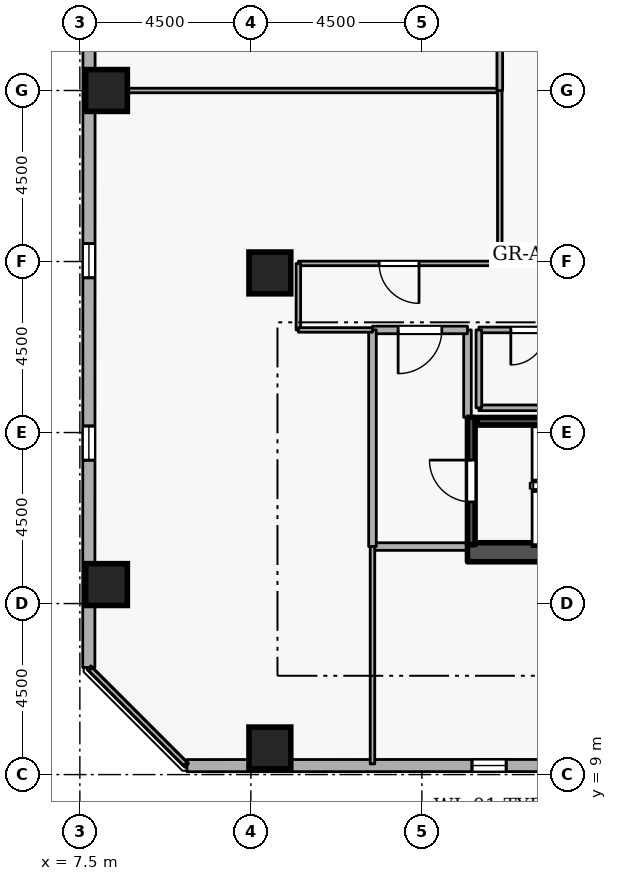
"""IFC4 building model, lengths in metres.
Left out: names, types, materials, properties, quantities, classifications, styles, units other than length and angle.
Written with IfcOpenShell. Run it as: python <this file> out.ifc"""

import sys

from ifc_helpers import new_model, si_unit, direction, frame, frame_2d, origin, origin_2d, place, context, subcontext, project, spatial, rectangle, extrude, element, fill, save


model = new_model("IFC4")
c1 = context("Model", 3, precision=1e-05, world=origin(), true_north=direction((0.0, 1.0)))
c2 = subcontext(c1, "Body", "Model", "MODEL_VIEW")
j1 = project(units=[si_unit("LENGTHUNIT", "METRE"), si_unit("PLANEANGLEUNIT", "RADIAN")], contexts=[c1])
p1 = place(None, origin())
s1 = spatial("IfcSite", under=j1, at=p1, CompositionType="ELEMENT")
p2 = place(p1, origin())
s2 = spatial("IfcBuilding", under=s1, at=p2, CompositionType="ELEMENT")
p3 = place(p2, frame((0.0, 0.0, 178.5)))
s3 = spatial("IfcBuildingStorey", under=s2, at=p3, CompositionType="ELEMENT", Elevation=178.5)
p4 = place(p3, frame((17.7, 14.85, 0.0), z_axis=(0.0, 0.0, 1.0), x_axis=(1.0, 0.0, 0.0)))
e1 = element("IfcWall", 1, at=p4, inside=s3, PredefinedType="SHEAR", context=c2, shape_type="SweptSolid", body=[
    extrude(rectangle(XDim=15.6, YDim=0.5, at=frame_2d((7.8, 0.0))), origin(), (0.0, 0.0, 1.0), 3.6),
])
for number, where, z_axis, x_axis in (
    (2, (12.5, 9.7, 0.0), (0.0, 0.0, 1.0), (1.0, 0.0, 0.0)),
    (3, (8.2, 14.0, 0.0), (0.0, 0.0, 1.0), (1.0, 0.0, 0.0)),
    (4, (8.2, 27.0, 0.0), (0.0, 0.0, 1.0), (1.0, 0.0, 0.0)),
    (5, (12.5, 22.2, 0.0), (0.0, 0.0, 1.0), (1.0, 0.0, 0.0)),
):
    element("IfcColumn", number, at=place(p3, frame(where, z_axis=z_axis, x_axis=x_axis)), inside=s3, PredefinedType="COLUMN", context=c2, shape_type="SweptSolid", body=[
        extrude(rectangle(XDim=1.1, YDim=1.1, at=origin_2d()), origin(), (0.0, 0.0, 1.0), 3.6),
    ])
p5 = place(p3, frame((10.319, 9.235, 0.0), z_axis=(0.0, 0.0, 1.0), x_axis=(0.999999944762, 0.000332378036, 0.0)))
e6 = element("IfcWall", 6, at=p5, inside=s3, PredefinedType="STANDARD", context=c2, shape_type="SweptSolid", body=[
    extrude(rectangle(XDim=33.054, YDim=0.32, at=frame_2d((16.527, 0.0))), origin(), (0.0, 0.0, 1.0), 2.7),
])
p6 = place(p5, frame((7.5, 0.0, 0.72)))
e7 = element("IfcOpeningElement", 7, at=p6, cuts=e6, PredefinedType="OPENING", context=c2, shape_type="SweptSolid", body=[
    extrude(rectangle(XDim=0.9, YDim=1.75, at=frame_2d((0.45, 0.875))), frame((0.0, 0.17, 0.0), z_axis=(0.0, -1.0, 0.0), x_axis=(1.0, 0.0, 0.0)), (0.0, 0.0, 1.0), 0.34),
])
p7 = place(p5, frame((12.3, 0.0, 0.72)))
e8 = element("IfcOpeningElement", 8, at=p7, cuts=e6, PredefinedType="OPENING", context=c2, shape_type="SweptSolid", body=[
    extrude(rectangle(XDim=0.9, YDim=1.75, at=frame_2d((0.45, 0.875))), frame((0.0, 0.17, 0.0), z_axis=(0.0, -1.0, 0.0), x_axis=(1.0, 0.0, 0.0)), (0.0, 0.0, 1.0), 0.34),
])
p8 = place(p5, frame((17.1, 0.0, 0.72)))
e9 = element("IfcOpeningElement", 9, at=p8, cuts=e6, PredefinedType="OPENING", context=c2, shape_type="SweptSolid", body=[
    extrude(rectangle(XDim=0.9, YDim=1.75, at=frame_2d((0.45, 0.875))), frame((0.0, 0.17, 0.0), z_axis=(0.0, -1.0, 0.0), x_axis=(1.0, 0.0, 0.0)), (0.0, 0.0, 1.0), 0.34),
])
p9 = place(p5, frame((21.9, 0.0, 0.72)))
e10 = element("IfcOpeningElement", 10, at=p9, cuts=e6, PredefinedType="OPENING", context=c2, shape_type="SweptSolid", body=[
    extrude(rectangle(XDim=0.9, YDim=1.75, at=frame_2d((0.45, 0.875))), frame((0.0, 0.17, 0.0), z_axis=(0.0, -1.0, 0.0), x_axis=(1.0, 0.0, 0.0)), (0.0, 0.0, 1.0), 0.34),
])
p10 = place(p3, frame((7.746, 44.872, 0.0), z_axis=(0.0, 0.0, 1.0), x_axis=(-0.000332378036, -0.999999944762, 0.0)))
e11 = element("IfcWall", 11, at=p10, inside=s3, PredefinedType="STANDARD", context=c2, shape_type="SweptSolid", body=[
    extrude(rectangle(XDim=33.054, YDim=0.32, at=frame_2d((16.527, 0.0))), origin(), (0.0, 0.0, 1.0), 2.7),
])
p11 = place(p10, frame((2.7, 0.0, 0.72)))
e12 = element("IfcOpeningElement", 12, at=p11, cuts=e11, PredefinedType="OPENING", context=c2, shape_type="SweptSolid", body=[
    extrude(rectangle(XDim=0.9, YDim=1.75, at=frame_2d((0.45, 0.875))), frame((0.0, 0.17, 0.0), z_axis=(0.0, -1.0, 0.0), x_axis=(1.0, 0.0, 0.0)), (0.0, 0.0, 1.0), 0.34),
])
p12 = place(p10, frame((7.5, 0.0, 0.72)))
e13 = element("IfcOpeningElement", 13, at=p12, cuts=e11, PredefinedType="OPENING", context=c2, shape_type="SweptSolid", body=[
    extrude(rectangle(XDim=0.9, YDim=1.75, at=frame_2d((0.45, 0.875))), frame((0.0, 0.17, 0.0), z_axis=(0.0, -1.0, 0.0), x_axis=(1.0, 0.0, 0.0)), (0.0, 0.0, 1.0), 0.34),
])
p13 = place(p10, frame((12.3, 0.0, 0.72)))
e14 = element("IfcOpeningElement", 14, at=p13, cuts=e11, PredefinedType="OPENING", context=c2, shape_type="SweptSolid", body=[
    extrude(rectangle(XDim=0.9, YDim=1.75, at=frame_2d((0.45, 0.875))), frame((0.0, 0.17, 0.0), z_axis=(0.0, -1.0, 0.0), x_axis=(1.0, 0.0, 0.0)), (0.0, 0.0, 1.0), 0.34),
])
p14 = place(p10, frame((21.9, 0.0, 0.72)))
e15 = element("IfcOpeningElement", 15, at=p14, cuts=e11, PredefinedType="OPENING", context=c2, shape_type="SweptSolid", body=[
    extrude(rectangle(XDim=0.9, YDim=1.75, at=frame_2d((0.45, 0.875))), frame((0.0, 0.17, 0.0), z_axis=(0.0, -1.0, 0.0), x_axis=(1.0, 0.0, 0.0)), (0.0, 0.0, 1.0), 0.34),
])
p15 = place(p10, frame((26.7, 0.0, 0.72)))
e16 = element("IfcOpeningElement", 16, at=p15, cuts=e11, PredefinedType="OPENING", context=c2, shape_type="SweptSolid", body=[
    extrude(rectangle(XDim=0.9, YDim=1.75, at=frame_2d((0.45, 0.875))), frame((0.0, 0.17, 0.0), z_axis=(0.0, -1.0, 0.0), x_axis=(1.0, 0.0, 0.0)), (0.0, 0.0, 1.0), 0.34),
])
p16 = place(p3, frame((17.8, 15.05, 0.0), z_axis=(0.0, 0.0, 1.0), x_axis=(0.0, 1.0, 0.0)))
e17 = element("IfcWall", 17, at=p16, inside=s3, PredefinedType="SHEAR", context=c2, shape_type="SweptSolid", body=[
    extrude(rectangle(XDim=3.35, YDim=0.2, at=frame_2d((1.675, 0.0))), origin(), (0.0, 0.0, 1.0), 3.6),
])
p17 = place(p16, frame((1.125, 0.0, 0.0)))
e18 = element("IfcOpeningElement", 18, at=p17, cuts=e17, PredefinedType="OPENING", context=c2, shape_type="SweptSolid", body=[
    extrude(rectangle(XDim=1.1, YDim=2.1, at=frame_2d((0.55, 1.05))), frame((0.0, 0.11, 0.0), z_axis=(0.0, -1.0, 0.0), x_axis=(1.0, 0.0, 0.0)), (0.0, 0.0, 1.0), 0.22),
])
p18 = place(p3, frame((25.05, 18.297, 0.0), z_axis=(0.0, 0.0, 1.0), x_axis=(-1.0, 0.0, 0.0)))
e19 = element("IfcWall", 19, at=p18, inside=s3, PredefinedType="SHEAR", context=c2, shape_type="SweptSolid", body=[
    extrude(rectangle(XDim=7.1, YDim=0.2, at=frame_2d((3.55, 0.0))), origin(), (0.0, 0.0, 1.0), 3.6),
])
p19 = place(p3, frame((15.2, 15.0, 0.0), z_axis=(0.0, 0.0, 1.0), x_axis=(1.0, 0.0, 0.0)))
e20 = element("IfcWall", 20, at=p19, inside=s3, PredefinedType="STANDARD", context=c2, shape_type="SweptSolid", body=[
    extrude(rectangle(XDim=2.5, YDim=0.2, at=frame_2d((1.25, 0.0))), origin(), (0.0, 0.0, 1.0), 3.34),
])
p20 = place(p3, frame((17.7, 18.4, 0.0), z_axis=(0.0, 0.0, 1.0), x_axis=(0.0, 1.0, 0.0)))
e21 = element("IfcWall", 21, at=p20, inside=s3, PredefinedType="STANDARD", context=c2, shape_type="SweptSolid", body=[
    extrude(rectangle(XDim=2.3, YDim=0.2, at=frame_2d((1.15, 0.0))), origin(), (0.0, 0.0, 1.0), 2.545),
])
p21 = place(p3, frame((17.7, 20.7, 0.0), z_axis=(0.0, 0.0, 1.0), x_axis=(-1.0, 0.0, 0.0)))
e22 = element("IfcWall", 22, at=p21, inside=s3, PredefinedType="STANDARD", context=c2, shape_type="SweptSolid", body=[
    extrude(rectangle(XDim=2.5, YDim=0.2, at=frame_2d((1.25, 0.0))), origin(), (0.0, 0.0, 1.0), 3.34),
])
p22 = place(p21, frame((0.675, 0.0, 0.0)))
e23 = element("IfcOpeningElement", 23, at=p22, cuts=e22, PredefinedType="OPENING", context=c2, shape_type="SweptSolid", body=[
    extrude(rectangle(XDim=1.15, YDim=2.1, at=frame_2d((0.575, 1.05))), frame((0.0, 0.11, 0.0), z_axis=(0.0, -1.0, 0.0), x_axis=(1.0, 0.0, 0.0)), (0.0, 0.0, 1.0), 0.22),
])
p23 = place(p3, frame((15.2, 20.7, 0.0), z_axis=(0.0, 0.0, 1.0), x_axis=(0.0, -1.0, 0.0)))
e24 = element("IfcWall", 24, at=p23, inside=s3, PredefinedType="STANDARD", context=c2, shape_type="SweptSolid", body=[
    extrude(rectangle(XDim=5.7, YDim=0.2, at=frame_2d((2.85, 0.0))), origin(), (0.0, 0.0, 1.0), 3.34),
])
p24 = place(p3, frame((18.0, 18.65, 0.0), z_axis=(0.0, 0.0, 1.0), x_axis=(1.0, 0.0, 0.0)))
e25 = element("IfcWall", 25, at=p24, inside=s3, PredefinedType="PARTITIONING", context=c2, shape_type="SweptSolid", body=[
    extrude(rectangle(XDim=2.6, YDim=0.15, at=frame_2d((1.3, 0.0))), origin(), (0.0, 0.0, 1.0), 3.34),
])
p25 = place(p3, frame((20.6, 20.7, 0.0), z_axis=(0.0, 0.0, 1.0), x_axis=(-1.0, 0.0, 0.0)))
e26 = element("IfcWall", 26, at=p25, inside=s3, PredefinedType="PARTITIONING", context=c2, shape_type="SweptSolid", body=[
    extrude(rectangle(XDim=2.6, YDim=0.15, at=frame_2d((1.3, 0.0))), origin(), (0.0, 0.0, 1.0), 3.34),
])
p26 = place(p25, frame((0.84, 0.0, 0.0)))
e27 = element("IfcOpeningElement", 27, at=p26, cuts=e26, PredefinedType="OPENING", context=c2, shape_type="SweptSolid", body=[
    extrude(rectangle(XDim=0.92, YDim=2.08, at=frame_2d((0.46, 1.04))), frame((0.0, 0.085, 0.0), z_axis=(0.0, -1.0, 0.0), x_axis=(1.0, 0.0, 0.0)), (0.0, 0.0, 1.0), 0.17),
])
p27 = place(p3, frame((18.0, 20.7, 0.0), z_axis=(0.0, 0.0, 1.0), x_axis=(0.0, -1.0, 0.0)))
e28 = element("IfcWall", 28, at=p27, inside=s3, PredefinedType="PARTITIONING", context=c2, shape_type="SweptSolid", body=[
    extrude(rectangle(XDim=2.05, YDim=0.15, at=frame_2d((1.025, 0.0))), origin(), (0.0, 0.0, 1.0), 2.545),
])
p28 = place(p3, frame((7.78, 27.0, 0.0), z_axis=(0.0, 0.0, 1.0), x_axis=(1.0, 0.0, 0.0)))
e29 = element("IfcWall", 29, at=p28, inside=s3, PredefinedType="PARTITIONING", context=c2, shape_type="SweptSolid", body=[
    extrude(rectangle(XDim=10.77, YDim=0.12, at=frame_2d((5.385, 0.0))), origin(), (0.0, 0.0, 1.0), 2.932),
])
p29 = place(p3, frame((18.55, 27.0, 0.0), z_axis=(0.0, 0.0, 1.0), x_axis=(0.0, -1.0, 0.0)))
e30 = element("IfcWall", 30, at=p29, inside=s3, PredefinedType="PARTITIONING", context=c2, shape_type="SweptSolid", body=[
    extrude(rectangle(XDim=4.55, YDim=0.12, at=frame_2d((2.275, 0.0))), origin(), (0.0, 0.0, 1.0), 3.34),
])
p30 = place(p3, frame((18.55, 22.45, 0.0), z_axis=(0.0, 0.0, 1.0), x_axis=(-1.0, 0.0, 0.0)))
e31 = element("IfcWall", 31, at=p30, inside=s3, PredefinedType="PARTITIONING", context=c2, shape_type="SweptSolid", body=[
    extrude(rectangle(XDim=5.3, YDim=0.12, at=frame_2d((2.65, 0.0))), origin(), (0.0, 0.0, 1.0), 3.34),
])
p31 = place(p30, frame((2.125, 0.0, 0.0)))
e32 = element("IfcOpeningElement", 32, at=p31, cuts=e31, PredefinedType="OPENING", context=c2, shape_type="SweptSolid", body=[
    extrude(rectangle(XDim=1.05, YDim=2.1, at=frame_2d((0.525, 1.05))), frame((0.0, 0.07, 0.0), z_axis=(0.0, -1.0, 0.0), x_axis=(1.0, 0.0, 0.0)), (0.0, 0.0, 1.0), 0.14),
])
p32 = place(p3, frame((13.25, 22.45, 0.0), z_axis=(0.0, 0.0, 1.0), x_axis=(0.0, -1.0, 0.0)))
e33 = element("IfcWall", 33, at=p32, inside=s3, PredefinedType="PARTITIONING", context=c2, shape_type="SweptSolid", body=[
    extrude(rectangle(XDim=1.75, YDim=0.12, at=frame_2d((0.875, 0.0))), origin(), (0.0, 0.0, 1.0), 3.34),
])
p33 = place(p3, frame((13.25, 20.7, 0.0), z_axis=(0.0, 0.0, 1.0), x_axis=(1.0, 0.0, 0.0)))
e34 = element("IfcWall", 34, at=p33, inside=s3, PredefinedType="PARTITIONING", context=c2, shape_type="SweptSolid", body=[
    extrude(rectangle(XDim=1.95, YDim=0.12, at=frame_2d((0.975, 0.0))), origin(), (0.0, 0.0, 1.0), 3.34),
])
p34 = place(p3, frame((15.2, 15.0, 0.0), z_axis=(0.0, 0.0, 1.0), x_axis=(0.0, -1.0, 0.0)))
e35 = element("IfcWall", 35, at=p34, inside=s3, PredefinedType="PARTITIONING", context=c2, shape_type="SweptSolid", body=[
    extrude(rectangle(XDim=5.72, YDim=0.12, at=frame_2d((2.86, 0.0))), origin(), (0.0, 0.0, 1.0), 3.34),
])
p35 = place(p3, frame((10.275, 9.28, 0.0), z_axis=(0.0, 0.0, 1.0), x_axis=(-0.707106781187, 0.707106781187, 0.0)))
e36 = element("IfcWall", 36, at=p35, inside=s3, PredefinedType="PARTITIONING", context=c2, shape_type="SweptSolid", body=[
    extrude(rectangle(XDim=3.528, YDim=0.12, at=frame_2d((1.764, 0.0))), origin(), (0.0, 0.0, 1.0), 3.34),
])
p36 = place(p3, frame((18.55, 31.55, 0.0), z_axis=(0.0, 0.0, 1.0), x_axis=(0.0, -1.0, 0.0)))
e37 = element("IfcWall", 37, at=p36, inside=s3, PredefinedType="PARTITIONING", context=c2, shape_type="SweptSolid", body=[
    extrude(rectangle(XDim=4.55, YDim=0.15, at=frame_2d((2.275, 0.0))), origin(), (0.0, 0.0, 1.0), 3.34),
])
p37 = place(p6, origin())
e38 = element("IfcWindow", 38, at=p37, inside=s3, PartitioningType="SINGLE_PANEL", PredefinedType="WINDOW", context=c2, shape_type="SweptSolid", body=[
    extrude(rectangle(XDim=0.9, YDim=1.75, at=frame_2d((0.45, 0.875))), frame((0.0, 0.03, 0.0), z_axis=(0.0, -1.0, 0.0), x_axis=(1.0, 0.0, 0.0)), (0.0, 0.0, 1.0), 0.06),
])
fill(e7, e38)
p38 = place(p14, origin())
e39 = element("IfcWindow", 39, at=p38, inside=s3, PartitioningType="SINGLE_PANEL", PredefinedType="WINDOW", context=c2, shape_type="SweptSolid", body=[
    extrude(rectangle(XDim=0.9, YDim=1.75, at=frame_2d((0.45, 0.875))), frame((0.0, 0.03, 0.0), z_axis=(0.0, -1.0, 0.0), x_axis=(1.0, 0.0, 0.0)), (0.0, 0.0, 1.0), 0.06),
])
fill(e15, e39)
p39 = place(p15, origin())
e40 = element("IfcWindow", 40, at=p39, inside=s3, PartitioningType="SINGLE_PANEL", PredefinedType="WINDOW", context=c2, shape_type="SweptSolid", body=[
    extrude(rectangle(XDim=0.9, YDim=1.75, at=frame_2d((0.45, 0.875))), frame((0.0, 0.03, 0.0), z_axis=(0.0, -1.0, 0.0), x_axis=(1.0, 0.0, 0.0)), (0.0, 0.0, 1.0), 0.06),
])
fill(e16, e40)
p40 = place(p17, origin())
e41 = element("IfcDoor", 41, at=p40, inside=s3, OperationType="SINGLE_SWING_RIGHT", PredefinedType="DOOR", context=c2, shape_type="SweptSolid", body=[
    extrude(rectangle(XDim=1.1, YDim=2.1, at=frame_2d((0.55, 1.05))), frame((0.0, 0.025, 0.0), z_axis=(0.0, -1.0, 0.0), x_axis=(1.0, 0.0, 0.0)), (0.0, 0.0, 1.0), 0.05),
])
fill(e18, e41)
p41 = place(p22, origin())
e42 = element("IfcDoor", 42, at=p41, inside=s3, OperationType="SINGLE_SWING_RIGHT", PredefinedType="DOOR", context=c2, shape_type="SweptSolid", body=[
    extrude(rectangle(XDim=1.15, YDim=2.1, at=frame_2d((0.575, 1.05))), frame((0.0, 0.025, 0.0), z_axis=(0.0, -1.0, 0.0), x_axis=(1.0, 0.0, 0.0)), (0.0, 0.0, 1.0), 0.05),
])
fill(e23, e42)
p42 = place(p26, origin())
e43 = element("IfcDoor", 43, at=p42, inside=s3, OperationType="SINGLE_SWING_RIGHT", PredefinedType="DOOR", context=c2, shape_type="SweptSolid", body=[
    extrude(rectangle(XDim=0.92, YDim=2.08, at=frame_2d((0.46, 1.04))), frame((0.0, 0.025, 0.0), z_axis=(0.0, -1.0, 0.0), x_axis=(1.0, 0.0, 0.0)), (0.0, 0.0, 1.0), 0.05),
])
fill(e27, e43)
p43 = place(p31, origin())
e44 = element("IfcDoor", 44, at=p43, inside=s3, OperationType="SINGLE_SWING_LEFT", PredefinedType="DOOR", context=c2, shape_type="SweptSolid", body=[
    extrude(rectangle(XDim=1.05, YDim=2.1, at=frame_2d((0.525, 1.05))), frame((0.0, 0.025, 0.0), z_axis=(0.0, -1.0, 0.0), x_axis=(1.0, 0.0, 0.0)), (0.0, 0.0, 1.0), 0.05),
])
fill(e32, e44)
save(model, sys.argv[1])
